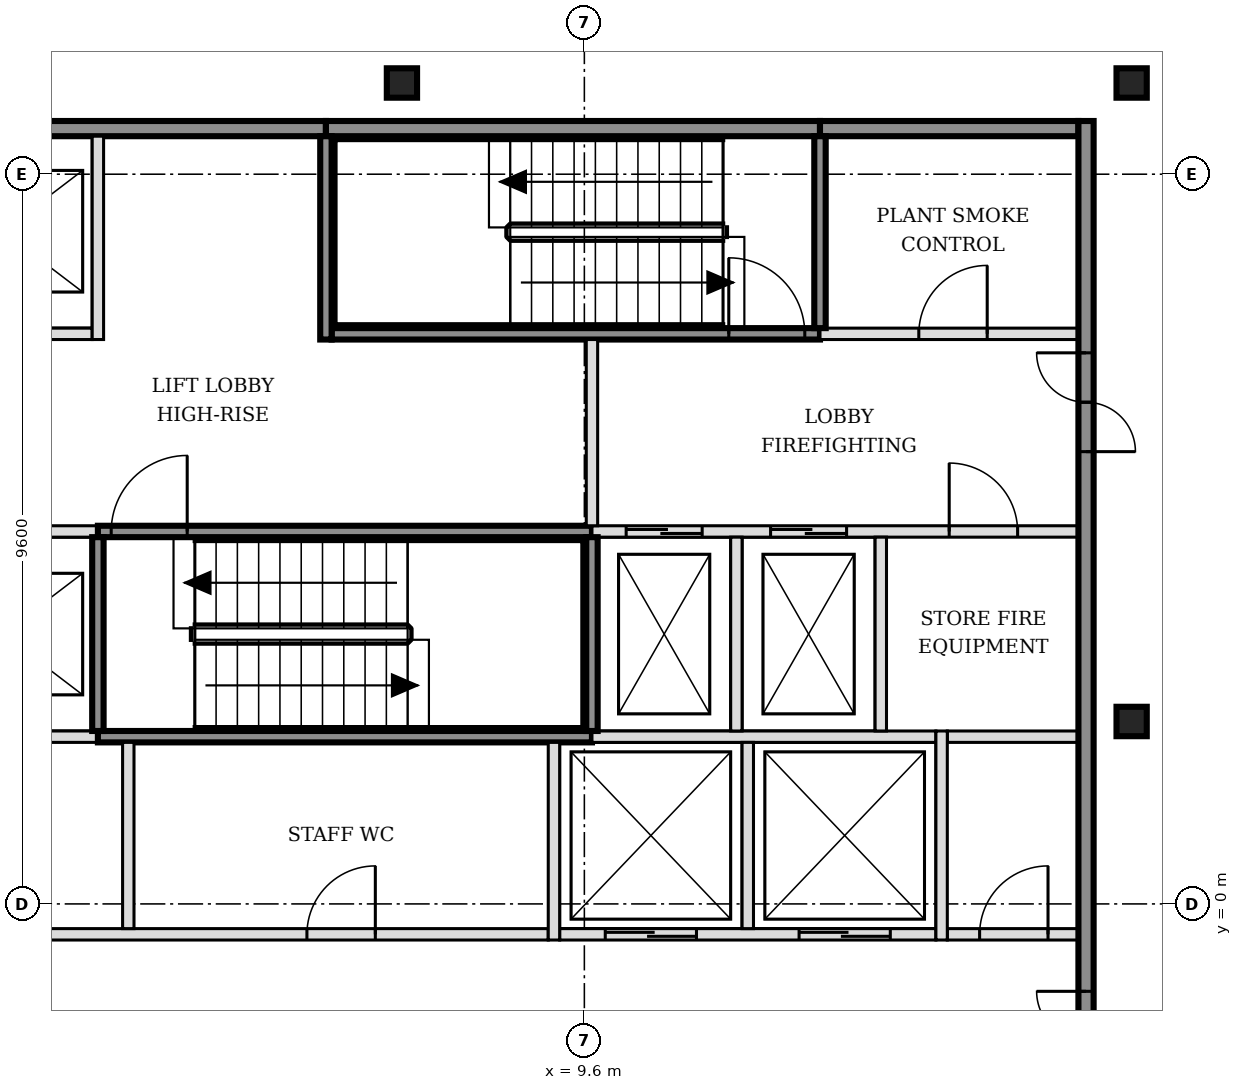
"""IFC4 building model, lengths in metres.
Left out: names, types, materials, properties, quantities, classifications, styles, units other than length and angle.
Written with IfcOpenShell. Run it as: python <this file> out.ifc"""

import sys

from ifc_helpers import new_model, si_unit, direction, frame, frame_2d, origin, origin_2d, place, context, subcontext, project, spatial, rectangle, i_section, extrude, element, fill, save


model = new_model("IFC4")
c1 = context("Model", 3, precision=1e-05, world=origin(), true_north=direction((0.0, 1.0)))
c2 = subcontext(c1, "Body", "Model", "MODEL_VIEW")
j1 = project(units=[si_unit("LENGTHUNIT", "METRE"), si_unit("PLANEANGLEUNIT", "RADIAN")], contexts=[c1])
p1 = place(None, origin())
s1 = spatial("IfcSite", under=j1, at=p1, CompositionType="ELEMENT")
p2 = place(p1, origin())
s2 = spatial("IfcBuilding", under=s1, at=p2, CompositionType="ELEMENT")
p3 = place(p2, frame((0.0, 0.0, 239.4)))
s3 = spatial("IfcBuildingStorey", under=s2, at=p3, CompositionType="ELEMENT", Elevation=239.4)
for number, where, z_axis, x_axis in (
    (1, (16.8, 2.4, -0.15), (0.0, 0.0, 1.0), (1.0, 0.0, 0.0)),
    (2, (7.2, 10.8, -0.15), (0.0, 0.0, 1.0), (1.0, 0.0, 0.0)),
    (3, (16.8, 10.8, -0.15), (0.0, 0.0, 1.0), (1.0, 0.0, 0.0)),
):
    element("IfcColumn", number, at=place(p3, frame(where, z_axis=z_axis, x_axis=x_axis)), inside=s3, PredefinedType="COLUMN", context=c2, shape_type="SweptSolid", body=[
        extrude(i_section(OverallWidth=0.398, OverallDepth=0.387, WebThickness=0.021, FlangeThickness=0.033, FilletRadius=0.015, at=origin_2d()), origin(), (0.0, 0.0, 1.0), 3.6),
    ])
p4 = place(p3, frame((-1.7, -0.4, 0.0), z_axis=(0.0, 0.0, 1.0), x_axis=(1.0, 0.0, 0.0)))
e4 = element("IfcWall", 4, at=p4, inside=s3, PredefinedType="PARTITIONING", context=c2, shape_type="SweptSolid", body=[
    extrude(rectangle(XDim=10.825, YDim=0.15, at=frame_2d((5.413, 0.0))), origin(), (0.0, 0.0, 1.0), 3.45),
])
p5 = place(p4, frame((2.15, 0.0, 0.0)))
e5 = element("IfcOpeningElement", 5, at=p5, cuts=e4, PredefinedType="OPENING", context=c2, shape_type="SweptSolid", body=[
    extrude(rectangle(XDim=0.9, YDim=2.1, at=frame_2d((0.45, 1.05))), frame((0.0, 0.085, 0.0), z_axis=(0.0, -1.0, 0.0), x_axis=(1.0, 0.0, 0.0)), (0.0, 0.0, 1.0), 0.17),
])
p6 = place(p4, frame((7.65, 0.0, 0.0)))
e6 = element("IfcOpeningElement", 6, at=p6, cuts=e4, PredefinedType="OPENING", context=c2, shape_type="SweptSolid", body=[
    extrude(rectangle(XDim=0.9, YDim=2.1, at=frame_2d((0.45, 1.05))), frame((0.0, 0.085, 0.0), z_axis=(0.0, -1.0, 0.0), x_axis=(1.0, 0.0, 0.0)), (0.0, 0.0, 1.0), 0.17),
])
p7 = place(p3, frame((9.275, -0.4, 0.0), z_axis=(0.0, 0.0, 1.0), x_axis=(1.0, 0.0, 0.0)))
e7 = element("IfcWall", 7, at=p7, inside=s3, PredefinedType="SOLIDWALL", context=c2, shape_type="SweptSolid", body=[
    extrude(rectangle(XDim=4.95, YDim=0.15, at=frame_2d((2.475, 0.0))), origin(), (0.0, 0.0, 1.0), 3.45),
])
p8 = place(p7, frame((0.6, 0.0, 0.0)))
e8 = element("IfcOpeningElement", 8, at=p8, cuts=e7, PredefinedType="OPENING", context=c2, shape_type="SweptSolid", body=[
    extrude(rectangle(XDim=1.2, YDim=2.1, at=frame_2d((0.6, 1.05))), frame((0.0, 0.085, 0.0), z_axis=(0.0, -1.0, 0.0), x_axis=(1.0, 0.0, 0.0)), (0.0, 0.0, 1.0), 0.17),
])
p9 = place(p7, frame((3.15, 0.0, 0.0)))
e9 = element("IfcOpeningElement", 9, at=p9, cuts=e7, PredefinedType="OPENING", context=c2, shape_type="SweptSolid", body=[
    extrude(rectangle(XDim=1.2, YDim=2.1, at=frame_2d((0.6, 1.05))), frame((0.0, 0.085, 0.0), z_axis=(0.0, -1.0, 0.0), x_axis=(1.0, 0.0, 0.0)), (0.0, 0.0, 1.0), 0.17),
])
p10 = place(p3, frame((14.375, -0.4, 0.0), z_axis=(0.0, 0.0, 1.0), x_axis=(1.0, 0.0, 0.0)))
e10 = element("IfcWall", 10, at=p10, inside=s3, PredefinedType="PARTITIONING", context=c2, shape_type="SweptSolid", body=[
    extrude(rectangle(XDim=1.725, YDim=0.15, at=frame_2d((0.863, 0.0))), origin(), (0.0, 0.0, 1.0), 3.45),
])
p11 = place(p10, frame((0.425, 0.0, 0.0)))
e11 = element("IfcOpeningElement", 11, at=p11, cuts=e10, PredefinedType="OPENING", context=c2, shape_type="SweptSolid", body=[
    extrude(rectangle(XDim=0.9, YDim=2.1, at=frame_2d((0.45, 1.05))), frame((0.0, 0.085, 0.0), z_axis=(0.0, -1.0, 0.0), x_axis=(1.0, 0.0, 0.0)), (0.0, 0.0, 1.0), 0.17),
])
p12 = place(p3, frame((-1.7, 2.2, 0.0), z_axis=(0.0, 0.0, 1.0), x_axis=(1.0, 0.0, 0.0)))
e12 = element("IfcWall", 12, at=p12, inside=s3, PredefinedType="SOLIDWALL", context=c2, shape_type="SweptSolid", body=[
    extrude(rectangle(XDim=4.9, YDim=0.15, at=frame_2d((2.45, 0.0))), origin(), (0.0, 0.0, 1.0), 3.45),
])
p13 = place(p3, frame((3.2, 2.2, 0.0), z_axis=(0.0, 0.0, 1.0), x_axis=(1.0, 0.0, 0.0)))
e13 = element("IfcWall", 13, at=p13, inside=s3, PredefinedType="SOLIDWALL", context=c2, shape_type="SweptSolid", body=[
    extrude(rectangle(XDim=6.5, YDim=0.15, at=frame_2d((3.25, 0.0))), origin(), (0.0, 0.0, 1.0), 3.45),
])
p14 = place(p3, frame((9.7, 2.2, 0.0), z_axis=(0.0, 0.0, 1.0), x_axis=(1.0, 0.0, 0.0)))
e14 = element("IfcWall", 14, at=p14, inside=s3, PredefinedType="SOLIDWALL", context=c2, shape_type="SweptSolid", body=[
    extrude(rectangle(XDim=4.525, YDim=0.15, at=frame_2d((2.263, 0.0))), origin(), (0.0, 0.0, 1.0), 3.45),
])
p15 = place(p3, frame((14.375, 2.2, 0.0), z_axis=(0.0, 0.0, 1.0), x_axis=(1.0, 0.0, 0.0)))
e15 = element("IfcWall", 15, at=p15, inside=s3, PredefinedType="PARTITIONING", context=c2, shape_type="SweptSolid", body=[
    extrude(rectangle(XDim=1.725, YDim=0.15, at=frame_2d((0.863, 0.0))), origin(), (0.0, 0.0, 1.0), 3.45),
])
p16 = place(p3, frame((-1.7, 4.9, 0.0), z_axis=(0.0, 0.0, 1.0), x_axis=(1.0, 0.0, 0.0)))
e16 = element("IfcWall", 16, at=p16, inside=s3, PredefinedType="SOLIDWALL", context=c2, shape_type="SweptSolid", body=[
    extrude(rectangle(XDim=4.9, YDim=0.15, at=frame_2d((2.45, 0.0))), origin(), (0.0, 0.0, 1.0), 3.45),
])
p17 = place(p16, frame((0.6, 0.0, 0.0)))
e17 = element("IfcOpeningElement", 17, at=p17, cuts=e16, PredefinedType="OPENING", context=c2, shape_type="SweptSolid", body=[
    extrude(rectangle(XDim=1.1, YDim=2.1, at=frame_2d((0.55, 1.05))), frame((0.0, 0.085, 0.0), z_axis=(0.0, -1.0, 0.0), x_axis=(1.0, 0.0, 0.0)), (0.0, 0.0, 1.0), 0.17),
])
p18 = place(p16, frame((3.1, 0.0, 0.0)))
e18 = element("IfcOpeningElement", 18, at=p18, cuts=e16, PredefinedType="OPENING", context=c2, shape_type="SweptSolid", body=[
    extrude(rectangle(XDim=1.1, YDim=2.1, at=frame_2d((0.55, 1.05))), frame((0.0, 0.085, 0.0), z_axis=(0.0, -1.0, 0.0), x_axis=(1.0, 0.0, 0.0)), (0.0, 0.0, 1.0), 0.17),
])
p19 = place(p3, frame((3.2, 4.9, 0.0), z_axis=(0.0, 0.0, 1.0), x_axis=(1.0, 0.0, 0.0)))
e19 = element("IfcWall", 19, at=p19, inside=s3, PredefinedType="SOLIDWALL", context=c2, shape_type="SweptSolid", body=[
    extrude(rectangle(XDim=6.5, YDim=0.15, at=frame_2d((3.25, 0.0))), origin(), (0.0, 0.0, 1.0), 3.45),
])
p20 = place(p19, frame((0.175, 0.0, 0.0)))
e20 = element("IfcOpeningElement", 20, at=p20, cuts=e19, PredefinedType="OPENING", context=c2, shape_type="SweptSolid", body=[
    extrude(rectangle(XDim=1.0, YDim=2.1, at=frame_2d((0.5, 1.05))), frame((0.0, 0.085, 0.0), z_axis=(0.0, -1.0, 0.0), x_axis=(1.0, 0.0, 0.0)), (0.0, 0.0, 1.0), 0.17),
])
p21 = place(p3, frame((9.7, 4.9, 0.0), z_axis=(0.0, 0.0, 1.0), x_axis=(1.0, 0.0, 0.0)))
e21 = element("IfcWall", 21, at=p21, inside=s3, PredefinedType="SOLIDWALL", context=c2, shape_type="SweptSolid", body=[
    extrude(rectangle(XDim=6.4, YDim=0.15, at=frame_2d((3.2, 0.0))), origin(), (0.0, 0.0, 1.0), 3.45),
])
p22 = place(p21, frame((0.45, 0.0, 0.0)))
e22 = element("IfcOpeningElement", 22, at=p22, cuts=e21, PredefinedType="OPENING", context=c2, shape_type="SweptSolid", body=[
    extrude(rectangle(XDim=1.0, YDim=2.1, at=frame_2d((0.5, 1.05))), frame((0.0, 0.085, 0.0), z_axis=(0.0, -1.0, 0.0), x_axis=(1.0, 0.0, 0.0)), (0.0, 0.0, 1.0), 0.17),
])
p23 = place(p21, frame((2.35, 0.0, 0.0)))
e23 = element("IfcOpeningElement", 23, at=p23, cuts=e21, PredefinedType="OPENING", context=c2, shape_type="SweptSolid", body=[
    extrude(rectangle(XDim=1.0, YDim=2.1, at=frame_2d((0.5, 1.05))), frame((0.0, 0.085, 0.0), z_axis=(0.0, -1.0, 0.0), x_axis=(1.0, 0.0, 0.0)), (0.0, 0.0, 1.0), 0.17),
])
p24 = place(p21, frame((4.7, 0.0, 0.0)))
e24 = element("IfcOpeningElement", 24, at=p24, cuts=e21, PredefinedType="OPENING", context=c2, shape_type="SweptSolid", body=[
    extrude(rectangle(XDim=0.9, YDim=2.1, at=frame_2d((0.45, 1.05))), frame((0.0, 0.085, 0.0), z_axis=(0.0, -1.0, 0.0), x_axis=(1.0, 0.0, 0.0)), (0.0, 0.0, 1.0), 0.17),
])
p25 = place(p3, frame((-1.7, 7.5, 0.0), z_axis=(0.0, 0.0, 1.0), x_axis=(1.0, 0.0, 0.0)))
e25 = element("IfcWall", 25, at=p25, inside=s3, PredefinedType="SOLIDWALL", context=c2, shape_type="SweptSolid", body=[
    extrude(rectangle(XDim=4.825, YDim=0.15, at=frame_2d((2.413, 0.0))), origin(), (0.0, 0.0, 1.0), 3.45),
])
p26 = place(p25, frame((0.6, 0.0, 0.0)))
e26 = element("IfcOpeningElement", 26, at=p26, cuts=e25, PredefinedType="OPENING", context=c2, shape_type="SweptSolid", body=[
    extrude(rectangle(XDim=1.1, YDim=2.1, at=frame_2d((0.55, 1.05))), frame((0.0, 0.085, 0.0), z_axis=(0.0, -1.0, 0.0), x_axis=(1.0, 0.0, 0.0)), (0.0, 0.0, 1.0), 0.17),
])
p27 = place(p25, frame((3.1, 0.0, 0.0)))
e27 = element("IfcOpeningElement", 27, at=p27, cuts=e25, PredefinedType="OPENING", context=c2, shape_type="SweptSolid", body=[
    extrude(rectangle(XDim=1.1, YDim=2.1, at=frame_2d((0.55, 1.05))), frame((0.0, 0.085, 0.0), z_axis=(0.0, -1.0, 0.0), x_axis=(1.0, 0.0, 0.0)), (0.0, 0.0, 1.0), 0.17),
])
p28 = place(p3, frame((6.275, 7.5, 0.0), z_axis=(0.0, 0.0, 1.0), x_axis=(1.0, 0.0, 0.0)))
e28 = element("IfcWall", 28, at=p28, inside=s3, PredefinedType="SOLIDWALL", context=c2, shape_type="SweptSolid", body=[
    extrude(rectangle(XDim=6.425, YDim=0.15, at=frame_2d((3.212, 0.0))), origin(), (0.0, 0.0, 1.0), 3.45),
])
p29 = place(p28, frame((5.225, 0.0, 0.0)))
e29 = element("IfcOpeningElement", 29, at=p29, cuts=e28, PredefinedType="OPENING", context=c2, shape_type="SweptSolid", body=[
    extrude(rectangle(XDim=1.0, YDim=2.1, at=frame_2d((0.5, 1.05))), frame((0.0, 0.085, 0.0), z_axis=(0.0, -1.0, 0.0), x_axis=(1.0, 0.0, 0.0)), (0.0, 0.0, 1.0), 0.17),
])
p30 = place(p3, frame((12.7, 7.5, 0.0), z_axis=(0.0, 0.0, 1.0), x_axis=(1.0, 0.0, 0.0)))
e30 = element("IfcWall", 30, at=p30, inside=s3, PredefinedType="SOLIDWALL", context=c2, shape_type="SweptSolid", body=[
    extrude(rectangle(XDim=3.4, YDim=0.15, at=frame_2d((1.7, 0.0))), origin(), (0.0, 0.0, 1.0), 3.45),
])
p31 = place(p30, frame((1.3, 0.0, 0.0)))
e31 = element("IfcOpeningElement", 31, at=p31, cuts=e30, PredefinedType="OPENING", context=c2, shape_type="SweptSolid", body=[
    extrude(rectangle(XDim=0.9, YDim=2.1, at=frame_2d((0.45, 1.05))), frame((0.0, 0.085, 0.0), z_axis=(0.0, -1.0, 0.0), x_axis=(1.0, 0.0, 0.0)), (0.0, 0.0, 1.0), 0.17),
])
p32 = place(p3, frame((-1.7, 10.2, 0.0), z_axis=(0.0, 0.0, 1.0), x_axis=(1.0, 0.0, 0.0)))
e32 = element("IfcWall", 32, at=p32, inside=s3, PredefinedType="SOLIDWALL", context=c2, shape_type="SweptSolid", body=[
    extrude(rectangle(XDim=7.9, YDim=0.2, at=frame_2d((3.95, 0.0))), origin(), (0.0, 0.0, 1.0), 3.45),
])
p33 = place(p3, frame((6.2, 10.2, 0.0), z_axis=(0.0, 0.0, 1.0), x_axis=(1.0, 0.0, 0.0)))
e33 = element("IfcWall", 33, at=p33, inside=s3, PredefinedType="SOLIDWALL", context=c2, shape_type="SweptSolid", body=[
    extrude(rectangle(XDim=6.5, YDim=0.2, at=frame_2d((3.25, 0.0))), origin(), (0.0, 0.0, 1.0), 3.45),
])
p34 = place(p3, frame((12.7, 10.2, 0.0), z_axis=(0.0, 0.0, 1.0), x_axis=(1.0, 0.0, 0.0)))
e34 = element("IfcWall", 34, at=p34, inside=s3, PredefinedType="SOLIDWALL", context=c2, shape_type="SweptSolid", body=[
    extrude(rectangle(XDim=3.4, YDim=0.2, at=frame_2d((1.7, 0.0))), origin(), (0.0, 0.0, 1.0), 3.45),
])
p35 = place(p3, frame((3.2, 2.275, 0.0), z_axis=(0.0, 0.0, 1.0), x_axis=(0.0, 1.0, 0.0)))
e35 = element("IfcWall", 35, at=p35, inside=s3, PredefinedType="SOLIDWALL", context=c2, shape_type="SweptSolid", body=[
    extrude(rectangle(XDim=2.55, YDim=0.15, at=frame_2d((1.275, 0.0))), origin(), (0.0, 0.0, 1.0), 3.45),
])
p36 = place(p3, frame((3.2, 7.425, 0.0), z_axis=(0.0, 0.0, 1.0), x_axis=(0.0, 1.0, 0.0)))
e36 = element("IfcWall", 36, at=p36, inside=s3, PredefinedType="SOLIDWALL", context=c2, shape_type="SweptSolid", body=[
    extrude(rectangle(XDim=2.675, YDim=0.15, at=frame_2d((1.337, 0.0))), origin(), (0.0, 0.0, 1.0), 3.45),
])
p37 = place(p3, frame((3.6, -0.325, 0.0), z_axis=(0.0, 0.0, 1.0), x_axis=(0.0, 1.0, 0.0)))
e37 = element("IfcWall", 37, at=p37, inside=s3, PredefinedType="PARTITIONING", context=c2, shape_type="SweptSolid", body=[
    extrude(rectangle(XDim=2.45, YDim=0.15, at=frame_2d((1.225, 0.0))), origin(), (0.0, 0.0, 1.0), 3.45),
])
p38 = place(p3, frame((6.2, 7.425, 0.0), z_axis=(0.0, 0.0, 1.0), x_axis=(0.0, 1.0, 0.0)))
e38 = element("IfcWall", 38, at=p38, inside=s3, PredefinedType="SOLIDWALL", context=c2, shape_type="SweptSolid", body=[
    extrude(rectangle(XDim=2.675, YDim=0.15, at=frame_2d((1.337, 0.0))), origin(), (0.0, 0.0, 1.0), 3.45),
])
p39 = place(p3, frame((9.2, -0.475, 0.0), z_axis=(0.0, 0.0, 1.0), x_axis=(0.0, 1.0, 0.0)))
e39 = element("IfcWall", 39, at=p39, inside=s3, PredefinedType="SOLIDWALL", context=c2, shape_type="SweptSolid", body=[
    extrude(rectangle(XDim=2.6, YDim=0.15, at=frame_2d((1.3, 0.0))), origin(), (0.0, 0.0, 1.0), 3.45),
])
p40 = place(p3, frame((9.7, 2.275, 0.0), z_axis=(0.0, 0.0, 1.0), x_axis=(0.0, 1.0, 0.0)))
e40 = element("IfcWall", 40, at=p40, inside=s3, PredefinedType="SOLIDWALL", context=c2, shape_type="SweptSolid", body=[
    extrude(rectangle(XDim=2.55, YDim=0.15, at=frame_2d((1.275, 0.0))), origin(), (0.0, 0.0, 1.0), 3.45),
])
p41 = place(p3, frame((9.7, 4.975, 0.0), z_axis=(0.0, 0.0, 1.0), x_axis=(0.0, 1.0, 0.0)))
e41 = element("IfcWall", 41, at=p41, inside=s3, PredefinedType="SOLIDWALL", context=c2, shape_type="SweptSolid", body=[
    extrude(rectangle(XDim=2.45, YDim=0.15, at=frame_2d((1.225, 0.0))), origin(), (0.0, 0.0, 1.0), 3.45),
])
p42 = place(p3, frame((11.6, 2.275, 0.0), z_axis=(0.0, 0.0, 1.0), x_axis=(0.0, 1.0, 0.0)))
e42 = element("IfcWall", 42, at=p42, inside=s3, PredefinedType="SOLIDWALL", context=c2, shape_type="SweptSolid", body=[
    extrude(rectangle(XDim=2.55, YDim=0.15, at=frame_2d((1.275, 0.0))), origin(), (0.0, 0.0, 1.0), 3.45),
])
p43 = place(p3, frame((11.75, -0.325, 0.0), z_axis=(0.0, 0.0, 1.0), x_axis=(0.0, 1.0, 0.0)))
e43 = element("IfcWall", 43, at=p43, inside=s3, PredefinedType="SOLIDWALL", context=c2, shape_type="SweptSolid", body=[
    extrude(rectangle(XDim=2.45, YDim=0.15, at=frame_2d((1.225, 0.0))), origin(), (0.0, 0.0, 1.0), 3.45),
])
p44 = place(p3, frame((12.7, 7.575, 0.0), z_axis=(0.0, 0.0, 1.0), x_axis=(0.0, 1.0, 0.0)))
e44 = element("IfcWall", 44, at=p44, inside=s3, PredefinedType="SOLIDWALL", context=c2, shape_type="SweptSolid", body=[
    extrude(rectangle(XDim=2.525, YDim=0.15, at=frame_2d((1.263, 0.0))), origin(), (0.0, 0.0, 1.0), 3.45),
])
p45 = place(p3, frame((13.5, 2.275, 0.0), z_axis=(0.0, 0.0, 1.0), x_axis=(0.0, 1.0, 0.0)))
e45 = element("IfcWall", 45, at=p45, inside=s3, PredefinedType="SOLIDWALL", context=c2, shape_type="SweptSolid", body=[
    extrude(rectangle(XDim=2.55, YDim=0.15, at=frame_2d((1.275, 0.0))), origin(), (0.0, 0.0, 1.0), 3.45),
])
p46 = place(p3, frame((14.3, -0.475, 0.0), z_axis=(0.0, 0.0, 1.0), x_axis=(0.0, 1.0, 0.0)))
e46 = element("IfcWall", 46, at=p46, inside=s3, PredefinedType="SOLIDWALL", context=c2, shape_type="SweptSolid", body=[
    extrude(rectangle(XDim=2.75, YDim=0.15, at=frame_2d((1.375, 0.0))), origin(), (0.0, 0.0, 1.0), 3.45),
])
p47 = place(p3, frame((16.2, -5.5, 0.0), z_axis=(0.0, 0.0, 1.0), x_axis=(0.0, 1.0, 0.0)))
e47 = element("IfcWall", 47, at=p47, inside=s3, PredefinedType="SOLIDWALL", context=c2, shape_type="SweptSolid", body=[
    extrude(rectangle(XDim=15.8, YDim=0.2, at=frame_2d((7.9, 0.0))), origin(), (0.0, 0.0, 1.0), 3.45),
])
p48 = place(p47, frame((3.05, 0.0, 0.0)))
e48 = element("IfcOpeningElement", 48, at=p48, cuts=e47, PredefinedType="OPENING", context=c2, shape_type="SweptSolid", body=[
    extrude(rectangle(XDim=1.3, YDim=2.1, at=frame_2d((0.65, 1.05))), frame((0.0, 0.11, 0.0), z_axis=(0.0, -1.0, 0.0), x_axis=(1.0, 0.0, 0.0)), (0.0, 0.0, 1.0), 0.22),
])
p49 = place(p47, frame((11.45, 0.0, 0.0)))
e49 = element("IfcOpeningElement", 49, at=p49, cuts=e47, PredefinedType="OPENING", context=c2, shape_type="SweptSolid", body=[
    extrude(rectangle(XDim=1.3, YDim=2.1, at=frame_2d((0.65, 1.05))), frame((0.0, 0.11, 0.0), z_axis=(0.0, -1.0, 0.0), x_axis=(1.0, 0.0, 0.0)), (0.0, 0.0, 1.0), 0.22),
])
p50 = place(p8, origin())
e50 = element("IfcDoor", 50, at=p50, inside=s3, OperationType="DOUBLE_DOOR_SLIDING", PredefinedType="DOOR", context=c2, shape_type="SweptSolid", body=[
    extrude(rectangle(XDim=1.2, YDim=2.1, at=frame_2d((0.6, 1.05))), frame((0.0, 0.025, 0.0), z_axis=(0.0, -1.0, 0.0), x_axis=(1.0, 0.0, 0.0)), (0.0, 0.0, 1.0), 0.05),
])
fill(e8, e50)
p51 = place(p9, origin())
e51 = element("IfcDoor", 51, at=p51, inside=s3, OperationType="DOUBLE_DOOR_SLIDING", PredefinedType="DOOR", context=c2, shape_type="SweptSolid", body=[
    extrude(rectangle(XDim=1.2, YDim=2.1, at=frame_2d((0.6, 1.05))), frame((0.0, 0.025, 0.0), z_axis=(0.0, -1.0, 0.0), x_axis=(1.0, 0.0, 0.0)), (0.0, 0.0, 1.0), 0.05),
])
fill(e9, e51)
p52 = place(p22, origin())
e52 = element("IfcDoor", 52, at=p52, inside=s3, OperationType="DOUBLE_DOOR_SLIDING", PredefinedType="DOOR", context=c2, shape_type="SweptSolid", body=[
    extrude(rectangle(XDim=1.0, YDim=2.1, at=frame_2d((0.5, 1.05))), frame((0.0, 0.025, 0.0), z_axis=(0.0, -1.0, 0.0), x_axis=(1.0, 0.0, 0.0)), (0.0, 0.0, 1.0), 0.05),
])
fill(e22, e52)
p53 = place(p23, origin())
e53 = element("IfcDoor", 53, at=p53, inside=s3, OperationType="DOUBLE_DOOR_SLIDING", PredefinedType="DOOR", context=c2, shape_type="SweptSolid", body=[
    extrude(rectangle(XDim=1.0, YDim=2.1, at=frame_2d((0.5, 1.05))), frame((0.0, 0.025, 0.0), z_axis=(0.0, -1.0, 0.0), x_axis=(1.0, 0.0, 0.0)), (0.0, 0.0, 1.0), 0.05),
])
fill(e23, e53)
p54 = place(p20, origin())
e54 = element("IfcDoor", 54, at=p54, inside=s3, OperationType="SINGLE_SWING_RIGHT", PredefinedType="DOOR", context=c2, shape_type="SweptSolid", body=[
    extrude(rectangle(XDim=1.0, YDim=2.1, at=frame_2d((0.5, 1.05))), frame((0.0, 0.025, 0.0), z_axis=(0.0, -1.0, 0.0), x_axis=(1.0, 0.0, 0.0)), (0.0, 0.0, 1.0), 0.05),
])
fill(e20, e54)
p55 = place(p29, origin())
e55 = element("IfcDoor", 55, at=p55, inside=s3, OperationType="SINGLE_SWING_LEFT", PredefinedType="DOOR", context=c2, shape_type="SweptSolid", body=[
    extrude(rectangle(XDim=1.0, YDim=2.1, at=frame_2d((0.5, 1.05))), frame((0.0, 0.025, 0.0), z_axis=(0.0, -1.0, 0.0), x_axis=(1.0, 0.0, 0.0)), (0.0, 0.0, 1.0), 0.05),
])
fill(e29, e55)
p56 = place(p48, origin())
e56 = element("IfcDoor", 56, at=p56, inside=s3, OperationType="DOUBLE_DOOR_SINGLE_SWING", PredefinedType="DOOR", context=c2, shape_type="SweptSolid", body=[
    extrude(rectangle(XDim=1.3, YDim=2.1, at=frame_2d((0.65, 1.05))), frame((0.0, 0.025, 0.0), z_axis=(0.0, -1.0, 0.0), x_axis=(1.0, 0.0, 0.0)), (0.0, 0.0, 1.0), 0.05),
])
fill(e48, e56)
p57 = place(p49, origin())
e57 = element("IfcDoor", 57, at=p57, inside=s3, OperationType="DOUBLE_DOOR_SINGLE_SWING", PredefinedType="DOOR", context=c2, shape_type="SweptSolid", body=[
    extrude(rectangle(XDim=1.3, YDim=2.1, at=frame_2d((0.65, 1.05))), frame((0.0, 0.025, 0.0), z_axis=(0.0, -1.0, 0.0), x_axis=(1.0, 0.0, 0.0)), (0.0, 0.0, 1.0), 0.05),
])
fill(e49, e57)
p58 = place(p11, origin())
e58 = element("IfcDoor", 58, at=p58, inside=s3, OperationType="SINGLE_SWING_RIGHT", PredefinedType="DOOR", context=c2, shape_type="SweptSolid", body=[
    extrude(rectangle(XDim=0.9, YDim=2.1, at=frame_2d((0.45, 1.05))), frame((0.0, 0.025, 0.0), z_axis=(0.0, -1.0, 0.0), x_axis=(1.0, 0.0, 0.0)), (0.0, 0.0, 1.0), 0.05),
])
fill(e11, e58)
p59 = place(p24, origin())
e59 = element("IfcDoor", 59, at=p59, inside=s3, OperationType="SINGLE_SWING_LEFT", PredefinedType="DOOR", context=c2, shape_type="SweptSolid", body=[
    extrude(rectangle(XDim=0.9, YDim=2.1, at=frame_2d((0.45, 1.05))), frame((0.0, 0.025, 0.0), z_axis=(0.0, -1.0, 0.0), x_axis=(1.0, 0.0, 0.0)), (0.0, 0.0, 1.0), 0.05),
])
fill(e24, e59)
p60 = place(p31, origin())
e60 = element("IfcDoor", 60, at=p60, inside=s3, OperationType="SINGLE_SWING_RIGHT", PredefinedType="DOOR", context=c2, shape_type="SweptSolid", body=[
    extrude(rectangle(XDim=0.9, YDim=2.1, at=frame_2d((0.45, 1.05))), frame((0.0, 0.025, 0.0), z_axis=(0.0, -1.0, 0.0), x_axis=(1.0, 0.0, 0.0)), (0.0, 0.0, 1.0), 0.05),
])
fill(e31, e60)
p61 = place(p6, origin())
e61 = element("IfcDoor", 61, at=p61, inside=s3, OperationType="SINGLE_SWING_RIGHT", PredefinedType="DOOR", context=c2, shape_type="SweptSolid", body=[
    extrude(rectangle(XDim=0.9, YDim=2.1, at=frame_2d((0.45, 1.05))), frame((0.0, 0.025, 0.0), z_axis=(0.0, -1.0, 0.0), x_axis=(1.0, 0.0, 0.0)), (0.0, 0.0, 1.0), 0.05),
])
fill(e6, e61)
save(model, sys.argv[1])
